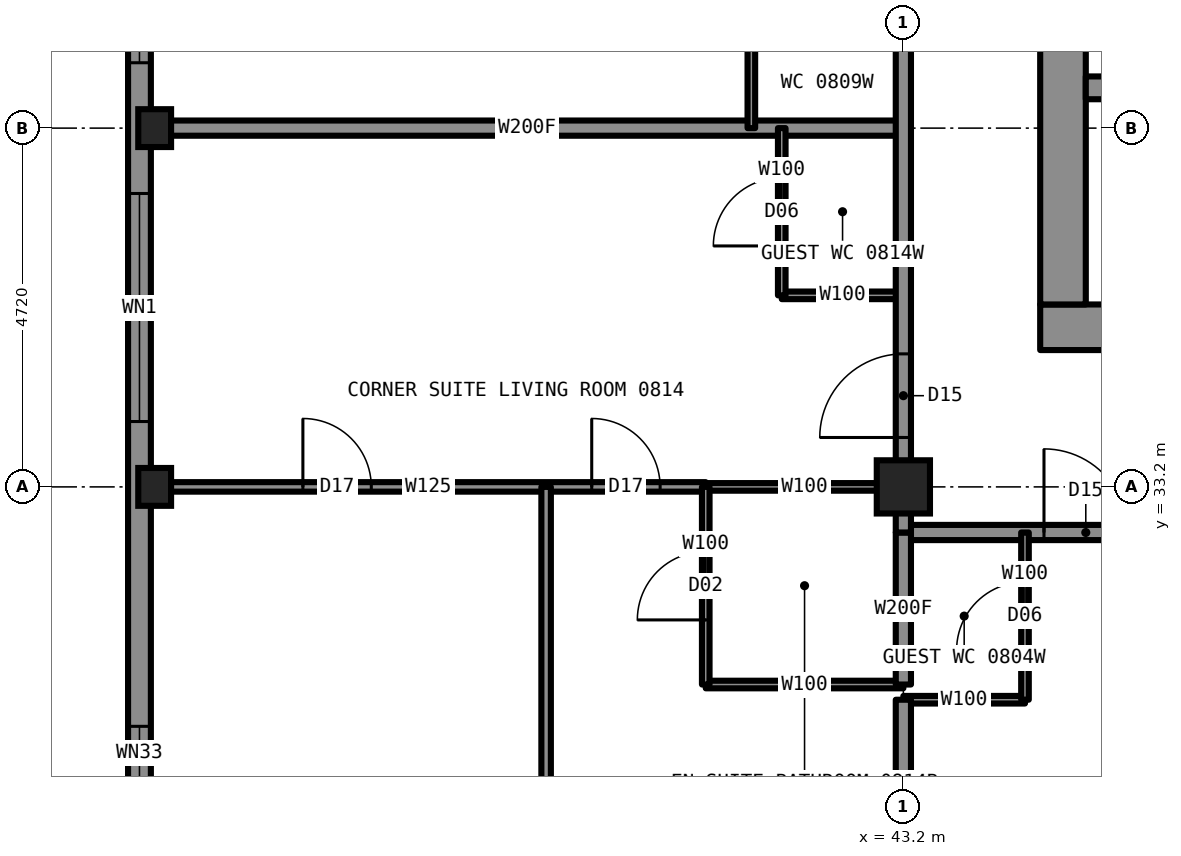
"""IFC4 building model, lengths in metres.
Left out: names, types, materials, properties, quantities, classifications, styles, units other than length and angle.
Written with IfcOpenShell. Run it as: python <this file> out.ifc"""

import sys

from ifc_helpers import new_model, si_unit, direction, frame, frame_2d, origin, origin_2d, place, context, subcontext, project, spatial, rectangle, hollow_rectangle, i_section, extrude, element, fill, save


model = new_model("IFC4")
c1 = context("Model", 3, precision=1e-05, world=origin(), true_north=direction((0.0, 1.0)))
c2 = subcontext(c1, "Body", "Model", "MODEL_VIEW")
j1 = project(units=[si_unit("LENGTHUNIT", "METRE"), si_unit("PLANEANGLEUNIT", "RADIAN")], contexts=[c1])
p1 = place(None, origin())
s1 = spatial("IfcSite", under=j1, at=p1, CompositionType="ELEMENT")
p2 = place(p1, origin())
s2 = spatial("IfcBuilding", under=s1, at=p2, CompositionType="ELEMENT")
p3 = place(p2, frame((0.0, 0.0, 28.5)))
s3 = spatial("IfcBuildingStorey", under=s2, at=p3, CompositionType="ELEMENT", Elevation=28.5)
for number, where, z_axis, x_axis in (
    (1, (33.35, 33.2, 0.0), (0.0, 0.0, 1.0), (1.0, 0.0, 0.0)),
    (2, (33.35, 37.92, 0.0), (0.0, 0.0, 1.0), (1.0, 0.0, 0.0)),
):
    element("IfcColumn", number, at=place(p3, frame(where, z_axis=z_axis, x_axis=x_axis)), inside=s3, PredefinedType="COLUMN", context=c2, shape_type="SweptSolid", body=[
        extrude(i_section(OverallWidth=0.432, OverallDepth=0.498, WebThickness=0.056, FlangeThickness=0.089, at=origin_2d()), origin(), (0.0, 0.0, 1.0), 3.5),
    ])
p4 = place(p3, frame((43.2, 33.2, 0.0), z_axis=(0.0, 0.0, 1.0), x_axis=(1.0, 0.0, 0.0)))
e3 = element("IfcColumn", 3, at=p4, inside=s3, PredefinedType="COLUMN", context=c2, shape_type="SweptSolid", body=[
    extrude(hollow_rectangle(XDim=0.7, YDim=0.7, WallThickness=0.06, at=origin_2d()), origin(), (0.0, 0.0, 1.0), 3.5),
])
p5 = place(p3, frame((45.0, 35.3, 0.0), z_axis=(0.0, 0.0, 1.0), x_axis=(1.0, 0.0, 0.0)))
e4 = element("IfcWall", 4, at=p5, inside=s3, PredefinedType="SHEAR", context=c2, shape_type="SweptSolid", body=[
    extrude(rectangle(XDim=20.0, YDim=0.6, at=frame_2d((10.0, 0.0))), origin(), (0.0, 0.0, 1.0), 3.5),
])
p6 = place(p3, frame((45.3, 35.6, 0.0), z_axis=(0.0, 0.0, 1.0), x_axis=(0.0, 1.0, 0.0)))
e5 = element("IfcWall", 5, at=p6, inside=s3, PredefinedType="SHEAR", context=c2, shape_type="SweptSolid", body=[
    extrude(rectangle(XDim=18.8, YDim=0.6, at=frame_2d((9.4, 0.0))), origin(), (0.0, 0.0, 1.0), 3.5),
])
p7 = place(p6, frame((13.4, 0.0, 0.0)))
e6 = element("IfcOpeningElement", 6, at=p7, cuts=e5, PredefinedType="OPENING", context=c2, shape_type="SweptSolid", body=[
    extrude(rectangle(XDim=1.8, YDim=2.2, at=frame_2d((0.9, 1.1))), frame((0.0, 0.31, 0.0), z_axis=(0.0, -1.0, 0.0), x_axis=(1.0, 0.0, 0.0)), (0.0, 0.0, 1.0), 0.62),
])
p8 = place(p6, frame((3.6, 0.0, 0.0)))
e7 = element("IfcOpeningElement", 7, at=p8, cuts=e5, PredefinedType="OPENING", context=c2, shape_type="SweptSolid", body=[
    extrude(rectangle(XDim=1.8, YDim=2.2, at=frame_2d((0.9, 1.1))), frame((0.0, 0.31, 0.0), z_axis=(0.0, -1.0, 0.0), x_axis=(1.0, 0.0, 0.0)), (0.0, 0.0, 1.0), 0.62),
])
p9 = place(p6, frame((6.4, 0.0, 0.0)))
e8 = element("IfcOpeningElement", 8, at=p9, cuts=e5, PredefinedType="OPENING", context=c2, shape_type="SweptSolid", body=[
    extrude(rectangle(XDim=1.2, YDim=2.2, at=frame_2d((0.6, 1.1))), frame((0.0, 0.31, 0.0), z_axis=(0.0, -1.0, 0.0), x_axis=(1.0, 0.0, 0.0)), (0.0, 0.0, 1.0), 0.62),
])
p10 = place(p3, frame((45.6, 38.45, 0.0), z_axis=(0.0, 0.0, 1.0), x_axis=(1.0, 0.0, 0.0)))
e9 = element("IfcWall", 9, at=p10, inside=s3, PredefinedType="SHEAR", context=c2, shape_type="SweptSolid", body=[
    extrude(rectangle(XDim=18.8, YDim=0.3, at=frame_2d((9.4, 0.0))), origin(), (0.0, 0.0, 1.0), 3.5),
])
p11 = place(p3, frame((40.6, 33.2, 0.0), z_axis=(0.0, 0.0, 1.0), x_axis=(1.0, 0.0, 0.0)))
e10 = element("IfcWall", 10, at=p11, inside=s3, PredefinedType="PARTITIONING", context=c2, shape_type="SweptSolid", body=[
    extrude(rectangle(XDim=2.6, YDim=0.1, at=frame_2d((1.3, 0.0))), origin(), (0.0, 0.0, 1.0), 2.573),
])
p12 = place(p3, frame((33.3, 33.2, 0.0), z_axis=(0.0, 0.0, 1.0), x_axis=(1.0, 0.0, 0.0)))
e11 = element("IfcWall", 11, at=p12, inside=s3, PredefinedType="PARTITIONING", context=c2, shape_type="SweptSolid", body=[
    extrude(rectangle(XDim=7.3, YDim=0.125, at=frame_2d((3.65, 0.0))), origin(), (0.0, 0.0, 1.0), 2.573),
])
p13 = place(p12, frame((5.8, 0.0, 0.0)))
e12 = element("IfcOpeningElement", 12, at=p13, cuts=e11, PredefinedType="OPENING", context=c2, shape_type="SweptSolid", body=[
    extrude(rectangle(XDim=0.9, YDim=2.2, at=frame_2d((0.45, 1.1))), frame((0.0, 0.073, 0.0), z_axis=(0.0, -1.0, 0.0), x_axis=(1.0, 0.0, 0.0)), (0.0, 0.0, 1.0), 0.145),
])
p14 = place(p12, frame((2.0, 0.0, 0.0)))
e13 = element("IfcOpeningElement", 13, at=p14, cuts=e11, PredefinedType="OPENING", context=c2, shape_type="SweptSolid", body=[
    extrude(rectangle(XDim=0.9, YDim=2.2, at=frame_2d((0.45, 1.1))), frame((0.0, 0.073, 0.0), z_axis=(0.0, -1.0, 0.0), x_axis=(1.0, 0.0, 0.0)), (0.0, 0.0, 1.0), 0.145),
])
p15 = place(p3, frame((43.2, 32.6, 0.0), z_axis=(0.0, 0.0, 1.0), x_axis=(1.0, 0.0, 0.0)))
e14 = element("IfcWall", 14, at=p15, inside=s3, PredefinedType="PARTITIONING", context=c2, shape_type="SweptSolid", body=[
    extrude(rectangle(XDim=23.6, YDim=0.2, at=frame_2d((11.8, 0.0))), origin(), (0.0, 0.0, 1.0), 3.33),
])
p16 = place(p15, frame((1.85, 0.0, 0.0)))
e15 = element("IfcOpeningElement", 15, at=p16, cuts=e14, PredefinedType="OPENING", context=c2, shape_type="SweptSolid", body=[
    extrude(rectangle(XDim=1.1, YDim=2.2, at=frame_2d((0.55, 1.1))), frame((0.0, 0.11, 0.0), z_axis=(0.0, -1.0, 0.0), x_axis=(1.0, 0.0, 0.0)), (0.0, 0.0, 1.0), 0.22),
])
p17 = place(p15, frame((14.56, 0.0, 0.0)))
e16 = element("IfcOpeningElement", 16, at=p17, cuts=e14, PredefinedType="OPENING", context=c2, shape_type="SweptSolid", body=[
    extrude(rectangle(XDim=1.0, YDim=2.2, at=frame_2d((0.5, 1.1))), frame((0.0, 0.11, 0.0), z_axis=(0.0, -1.0, 0.0), x_axis=(1.0, 0.0, 0.0)), (0.0, 0.0, 1.0), 0.22),
])
p18 = place(p15, frame((19.28, 0.0, 0.0)))
e17 = element("IfcOpeningElement", 17, at=p18, cuts=e14, PredefinedType="OPENING", context=c2, shape_type="SweptSolid", body=[
    extrude(rectangle(XDim=1.0, YDim=2.2, at=frame_2d((0.5, 1.1))), frame((0.0, 0.11, 0.0), z_axis=(0.0, -1.0, 0.0), x_axis=(1.0, 0.0, 0.0)), (0.0, 0.0, 1.0), 0.22),
])
p19 = place(p3, frame((40.6, 30.6, 0.0), z_axis=(0.0, 0.0, 1.0), x_axis=(1.0, 0.0, 0.0)))
e18 = element("IfcWall", 18, at=p19, inside=s3, PredefinedType="PARTITIONING", context=c2, shape_type="SweptSolid", body=[
    extrude(rectangle(XDim=2.6, YDim=0.1, at=frame_2d((1.3, 0.0))), origin(), (0.0, 0.0, 1.0), 3.33),
])
p20 = place(p3, frame((43.2, 30.4, 0.0), z_axis=(0.0, 0.0, 1.0), x_axis=(1.0, 0.0, 0.0)))
e19 = element("IfcWall", 19, at=p20, inside=s3, PredefinedType="PARTITIONING", context=c2, shape_type="SweptSolid", body=[
    extrude(rectangle(XDim=1.6, YDim=0.1, at=frame_2d((0.8, 0.0))), origin(), (0.0, 0.0, 1.0), 3.33),
])
p21 = place(p3, frame((33.3, 37.92, 0.0), z_axis=(0.0, 0.0, 1.0), x_axis=(1.0, 0.0, 0.0)))
e20 = element("IfcWall", 20, at=p21, inside=s3, PredefinedType="PARTITIONING", context=c2, shape_type="SweptSolid", body=[
    extrude(rectangle(XDim=9.9, YDim=0.2, at=frame_2d((4.95, 0.0))), origin(), (0.0, 0.0, 1.0), 2.573),
])
p22 = place(p3, frame((41.6, 35.72, 0.0), z_axis=(0.0, 0.0, 1.0), x_axis=(1.0, 0.0, 0.0)))
e21 = element("IfcWall", 21, at=p22, inside=s3, PredefinedType="PARTITIONING", context=c2, shape_type="SweptSolid", body=[
    extrude(rectangle(XDim=1.6, YDim=0.1, at=frame_2d((0.8, 0.0))), origin(), (0.0, 0.0, 1.0), 2.723),
])
p23 = place(p3, frame((44.8, 30.4, 0.0), z_axis=(0.0, 0.0, 1.0), x_axis=(0.0, 1.0, 0.0)))
e22 = element("IfcWall", 22, at=p23, inside=s3, PredefinedType="PARTITIONING", context=c2, shape_type="SweptSolid", body=[
    extrude(rectangle(XDim=2.2, YDim=0.1, at=frame_2d((1.1, 0.0))), origin(), (0.0, 0.0, 1.0), 3.33),
])
p24 = place(p23, frame((0.65, 0.0, 0.0)))
e23 = element("IfcOpeningElement", 23, at=p24, cuts=e22, PredefinedType="OPENING", context=c2, shape_type="SweptSolid", body=[
    extrude(rectangle(XDim=0.9, YDim=2.1, at=frame_2d((0.45, 1.05))), frame((0.0, 0.06, 0.0), z_axis=(0.0, -1.0, 0.0), x_axis=(1.0, 0.0, 0.0)), (0.0, 0.0, 1.0), 0.12),
])
p25 = place(p3, frame((43.2, 33.22, 0.0), z_axis=(0.0, 0.0, 1.0), x_axis=(0.0, 1.0, 0.0)))
e24 = element("IfcWall", 24, at=p25, inside=s3, PredefinedType="PARTITIONING", context=c2, shape_type="SweptSolid", body=[
    extrude(rectangle(XDim=23.56, YDim=0.2, at=frame_2d((11.78, 0.0))), origin(), (0.0, 0.0, 1.0), 3.33),
])
p26 = place(p25, frame((6.16, 0.0, 0.0)))
e25 = element("IfcOpeningElement", 25, at=p26, cuts=e24, PredefinedType="OPENING", context=c2, shape_type="SweptSolid", body=[
    extrude(rectangle(XDim=1.0, YDim=2.2, at=frame_2d((0.5, 1.1))), frame((0.0, 0.11, 0.0), z_axis=(0.0, -1.0, 0.0), x_axis=(1.0, 0.0, 0.0)), (0.0, 0.0, 1.0), 0.22),
])
p27 = place(p25, frame((11.68, 0.0, 0.0)))
e26 = element("IfcOpeningElement", 26, at=p27, cuts=e24, PredefinedType="OPENING", context=c2, shape_type="SweptSolid", body=[
    extrude(rectangle(XDim=1.0, YDim=2.2, at=frame_2d((0.5, 1.1))), frame((0.0, 0.11, 0.0), z_axis=(0.0, -1.0, 0.0), x_axis=(1.0, 0.0, 0.0)), (0.0, 0.0, 1.0), 0.22),
])
p28 = place(p25, frame((14.54, 0.0, 0.0)))
e27 = element("IfcOpeningElement", 27, at=p28, cuts=e24, PredefinedType="OPENING", context=c2, shape_type="SweptSolid", body=[
    extrude(rectangle(XDim=1.0, YDim=2.2, at=frame_2d((0.5, 1.1))), frame((0.0, 0.11, 0.0), z_axis=(0.0, -1.0, 0.0), x_axis=(1.0, 0.0, 0.0)), (0.0, 0.0, 1.0), 0.22),
])
p29 = place(p25, frame((21.83, 0.0, 0.0)))
e28 = element("IfcOpeningElement", 28, at=p29, cuts=e24, PredefinedType="OPENING", context=c2, shape_type="SweptSolid", body=[
    extrude(rectangle(XDim=1.1, YDim=2.2, at=frame_2d((0.55, 1.1))), frame((0.0, 0.11, 0.0), z_axis=(0.0, -1.0, 0.0), x_axis=(1.0, 0.0, 0.0)), (0.0, 0.0, 1.0), 0.22),
])
p30 = place(p25, frame((0.63, 0.0, 0.0)))
e29 = element("IfcOpeningElement", 29, at=p30, cuts=e24, PredefinedType="OPENING", context=c2, shape_type="SweptSolid", body=[
    extrude(rectangle(XDim=1.1, YDim=2.2, at=frame_2d((0.55, 1.1))), frame((0.0, 0.11, 0.0), z_axis=(0.0, -1.0, 0.0), x_axis=(1.0, 0.0, 0.0)), (0.0, 0.0, 1.0), 0.22),
])
p31 = place(p3, frame((43.2, 23.3, 0.0), z_axis=(0.0, 0.0, 1.0), x_axis=(0.0, 1.0, 0.0)))
e30 = element("IfcWall", 30, at=p31, inside=s3, PredefinedType="PARTITIONING", context=c2, shape_type="SweptSolid", body=[
    extrude(rectangle(XDim=7.1, YDim=0.2, at=frame_2d((3.55, 0.0))), origin(), (0.0, 0.0, 1.0), 2.573),
])
p32 = place(p3, frame((43.2, 30.6, 0.0), z_axis=(0.0, 0.0, 1.0), x_axis=(0.0, 1.0, 0.0)))
e31 = element("IfcWall", 31, at=p32, inside=s3, PredefinedType="PARTITIONING", context=c2, shape_type="SweptSolid", body=[
    extrude(rectangle(XDim=2.0, YDim=0.2, at=frame_2d((1.0, 0.0))), origin(), (0.0, 0.0, 1.0), 2.573),
])
p33 = place(p3, frame((41.6, 35.72, 0.0), z_axis=(0.0, 0.0, 1.0), x_axis=(0.0, 1.0, 0.0)))
e32 = element("IfcWall", 32, at=p33, inside=s3, PredefinedType="PARTITIONING", context=c2, shape_type="SweptSolid", body=[
    extrude(rectangle(XDim=2.2, YDim=0.1, at=frame_2d((1.1, 0.0))), origin(), (0.0, 0.0, 1.0), 3.33),
])
p34 = place(p33, frame((0.65, 0.0, 0.0)))
e33 = element("IfcOpeningElement", 33, at=p34, cuts=e32, PredefinedType="OPENING", context=c2, shape_type="SweptSolid", body=[
    extrude(rectangle(XDim=0.9, YDim=2.1, at=frame_2d((0.45, 1.05))), frame((0.0, 0.06, 0.0), z_axis=(0.0, -1.0, 0.0), x_axis=(1.0, 0.0, 0.0)), (0.0, 0.0, 1.0), 0.12),
])
p35 = place(p3, frame((41.2, 37.92, 0.0), z_axis=(0.0, 0.0, 1.0), x_axis=(0.0, 1.0, 0.0)))
e34 = element("IfcWall", 34, at=p35, inside=s3, PredefinedType="PARTITIONING", context=c2, shape_type="SweptSolid", body=[
    extrude(rectangle(XDim=1.2, YDim=0.1, at=frame_2d((0.6, 0.0))), origin(), (0.0, 0.0, 1.0), 3.33),
])
p36 = place(p3, frame((40.6, 30.6, 0.0), z_axis=(0.0, 0.0, 1.0), x_axis=(0.0, 1.0, 0.0)))
e35 = element("IfcWall", 35, at=p36, inside=s3, PredefinedType="PARTITIONING", context=c2, shape_type="SweptSolid", body=[
    extrude(rectangle(XDim=2.6, YDim=0.1, at=frame_2d((1.3, 0.0))), origin(), (0.0, 0.0, 1.0), 3.33),
])
p37 = place(p36, frame((0.85, 0.0, 0.0)))
e36 = element("IfcOpeningElement", 36, at=p37, cuts=e35, PredefinedType="OPENING", context=c2, shape_type="SweptSolid", body=[
    extrude(rectangle(XDim=0.9, YDim=2.1, at=frame_2d((0.45, 1.05))), frame((0.0, 0.06, 0.0), z_axis=(0.0, -1.0, 0.0), x_axis=(1.0, 0.0, 0.0)), (0.0, 0.0, 1.0), 0.12),
])
p38 = place(p3, frame((38.5, 23.306, 0.0), z_axis=(0.0, 0.0, 1.0), x_axis=(0.0, 1.0, 0.0)))
e37 = element("IfcWall", 37, at=p38, inside=s3, PredefinedType="PARTITIONING", context=c2, shape_type="SweptSolid", body=[
    extrude(rectangle(XDim=9.894, YDim=0.125, at=frame_2d((4.947, 0.0))), origin(), (0.0, 0.0, 1.0), 3.33),
])
p39 = place(p3, frame((33.15, 61.5, 0.0), z_axis=(0.0, 0.0, 1.0), x_axis=(0.0, -1.0, 0.0)))
e38 = element("IfcWall", 38, at=p39, inside=s3, PredefinedType="SOLIDWALL", context=c2, shape_type="SweptSolid", body=[
    extrude(rectangle(XDim=33.0, YDim=0.3, at=frame_2d((16.5, 0.0))), origin(), (0.0, 0.0, 1.0), 2.83),
])
p40 = place(p39, frame((0.85, 0.0, 0.5)))
e39 = element("IfcOpeningElement", 39, at=p40, cuts=e38, PredefinedType="OPENING", context=c2, shape_type="SweptSolid", body=[
    extrude(rectangle(XDim=3.0, YDim=2.0, at=frame_2d((1.5, 1.0))), frame((0.0, 0.16, 0.0), z_axis=(0.0, -1.0, 0.0), x_axis=(1.0, 0.0, 0.0)), (0.0, 0.0, 1.0), 0.32),
])
p41 = place(p39, frame((5.56, 0.0, 0.5)))
e40 = element("IfcOpeningElement", 40, at=p41, cuts=e38, PredefinedType="OPENING", context=c2, shape_type="SweptSolid", body=[
    extrude(rectangle(XDim=3.0, YDim=2.0, at=frame_2d((1.5, 1.0))), frame((0.0, 0.16, 0.0), z_axis=(0.0, -1.0, 0.0), x_axis=(1.0, 0.0, 0.0)), (0.0, 0.0, 1.0), 0.32),
])
p42 = place(p39, frame((10.28, 0.0, 0.5)))
e41 = element("IfcOpeningElement", 41, at=p42, cuts=e38, PredefinedType="OPENING", context=c2, shape_type="SweptSolid", body=[
    extrude(rectangle(XDim=3.0, YDim=2.0, at=frame_2d((1.5, 1.0))), frame((0.0, 0.16, 0.0), z_axis=(0.0, -1.0, 0.0), x_axis=(1.0, 0.0, 0.0)), (0.0, 0.0, 1.0), 0.32),
])
p43 = place(p39, frame((15.0, 0.0, 0.5)))
e42 = element("IfcOpeningElement", 42, at=p43, cuts=e38, PredefinedType="OPENING", context=c2, shape_type="SweptSolid", body=[
    extrude(rectangle(XDim=3.0, YDim=2.0, at=frame_2d((1.5, 1.0))), frame((0.0, 0.16, 0.0), z_axis=(0.0, -1.0, 0.0), x_axis=(1.0, 0.0, 0.0)), (0.0, 0.0, 1.0), 0.32),
])
p44 = place(p39, frame((19.72, 0.0, 0.5)))
e43 = element("IfcOpeningElement", 43, at=p44, cuts=e38, PredefinedType="OPENING", context=c2, shape_type="SweptSolid", body=[
    extrude(rectangle(XDim=3.0, YDim=2.0, at=frame_2d((1.5, 1.0))), frame((0.0, 0.16, 0.0), z_axis=(0.0, -1.0, 0.0), x_axis=(1.0, 0.0, 0.0)), (0.0, 0.0, 1.0), 0.32),
])
p45 = place(p39, frame((24.44, 0.0, 0.5)))
e44 = element("IfcOpeningElement", 44, at=p45, cuts=e38, PredefinedType="OPENING", context=c2, shape_type="SweptSolid", body=[
    extrude(rectangle(XDim=3.0, YDim=2.0, at=frame_2d((1.5, 1.0))), frame((0.0, 0.16, 0.0), z_axis=(0.0, -1.0, 0.0), x_axis=(1.0, 0.0, 0.0)), (0.0, 0.0, 1.0), 0.32),
])
p46 = place(p39, frame((29.15, 0.0, 0.5)))
e45 = element("IfcOpeningElement", 45, at=p46, cuts=e38, PredefinedType="OPENING", context=c2, shape_type="SweptSolid", body=[
    extrude(rectangle(XDim=3.0, YDim=2.0, at=frame_2d((1.5, 1.0))), frame((0.0, 0.16, 0.0), z_axis=(0.0, -1.0, 0.0), x_axis=(1.0, 0.0, 0.0)), (0.0, 0.0, 1.0), 0.32),
])
p47 = place(p3, frame((43.2, 32.6, 0.0), z_axis=(0.0, 0.0, 1.0), x_axis=(0.0, 1.0, 0.0)))
e46 = element("IfcWall", 46, at=p47, inside=s3, PredefinedType="PARTITIONING", context=c2, shape_type="SweptSolid", body=[
    extrude(rectangle(XDim=0.62, YDim=0.2, at=frame_2d((0.31, 0.0))), origin(), (0.0, 0.0, 1.0), 2.573),
])
p48 = place(p16, origin())
e47 = element("IfcDoor", 47, at=p48, inside=s3, OperationType="SINGLE_SWING_LEFT", PredefinedType="DOOR", context=c2, shape_type="SweptSolid", body=[
    extrude(rectangle(XDim=1.1, YDim=2.2, at=frame_2d((0.55, 1.1))), frame((0.0, 0.025, 0.0), z_axis=(0.0, -1.0, 0.0), x_axis=(1.0, 0.0, 0.0)), (0.0, 0.0, 1.0), 0.05),
])
fill(e15, e47)
p49 = place(p24, origin())
e48 = element("IfcDoor", 48, at=p49, inside=s3, OperationType="SINGLE_SWING_LEFT", PredefinedType="DOOR", context=c2, shape_type="SweptSolid", body=[
    extrude(rectangle(XDim=0.9, YDim=2.1, at=frame_2d((0.45, 1.05))), frame((0.0, 0.025, 0.0), z_axis=(0.0, -1.0, 0.0), x_axis=(1.0, 0.0, 0.0)), (0.0, 0.0, 1.0), 0.05),
])
fill(e23, e48)
p50 = place(p30, origin())
e49 = element("IfcDoor", 49, at=p50, inside=s3, OperationType="SINGLE_SWING_LEFT", PredefinedType="DOOR", context=c2, shape_type="SweptSolid", body=[
    extrude(rectangle(XDim=1.1, YDim=2.2, at=frame_2d((0.55, 1.1))), frame((0.0, 0.025, 0.0), z_axis=(0.0, -1.0, 0.0), x_axis=(1.0, 0.0, 0.0)), (0.0, 0.0, 1.0), 0.05),
])
fill(e29, e49)
p51 = place(p37, origin())
e50 = element("IfcDoor", 50, at=p51, inside=s3, OperationType="SINGLE_SWING_RIGHT", PredefinedType="DOOR", context=c2, shape_type="SweptSolid", body=[
    extrude(rectangle(XDim=0.9, YDim=2.1, at=frame_2d((0.45, 1.05))), frame((0.0, 0.025, 0.0), z_axis=(0.0, -1.0, 0.0), x_axis=(1.0, 0.0, 0.0)), (0.0, 0.0, 1.0), 0.05),
])
fill(e36, e50)
p52 = place(p13, origin())
e51 = element("IfcDoor", 51, at=p52, inside=s3, OperationType="SINGLE_SWING_LEFT", PredefinedType="DOOR", context=c2, shape_type="SweptSolid", body=[
    extrude(rectangle(XDim=0.9, YDim=2.2, at=frame_2d((0.45, 1.1))), frame((0.0, 0.025, 0.0), z_axis=(0.0, -1.0, 0.0), x_axis=(1.0, 0.0, 0.0)), (0.0, 0.0, 1.0), 0.05),
])
fill(e12, e51)
p53 = place(p14, origin())
e52 = element("IfcDoor", 52, at=p53, inside=s3, OperationType="SINGLE_SWING_LEFT", PredefinedType="DOOR", context=c2, shape_type="SweptSolid", body=[
    extrude(rectangle(XDim=0.9, YDim=2.2, at=frame_2d((0.45, 1.1))), frame((0.0, 0.025, 0.0), z_axis=(0.0, -1.0, 0.0), x_axis=(1.0, 0.0, 0.0)), (0.0, 0.0, 1.0), 0.05),
])
fill(e13, e52)
p54 = place(p34, origin())
e53 = element("IfcDoor", 53, at=p54, inside=s3, OperationType="SINGLE_SWING_LEFT", PredefinedType="DOOR", context=c2, shape_type="SweptSolid", body=[
    extrude(rectangle(XDim=0.9, YDim=2.1, at=frame_2d((0.45, 1.05))), frame((0.0, 0.025, 0.0), z_axis=(0.0, -1.0, 0.0), x_axis=(1.0, 0.0, 0.0)), (0.0, 0.0, 1.0), 0.05),
])
fill(e33, e53)
p55 = place(p44, origin())
e54 = element("IfcWindow", 54, at=p55, inside=s3, PartitioningType="SINGLE_PANEL", PredefinedType="WINDOW", context=c2, shape_type="SweptSolid", body=[
    extrude(rectangle(XDim=3.0, YDim=2.0, at=frame_2d((1.5, 1.0))), frame((0.0, 0.03, 0.0), z_axis=(0.0, -1.0, 0.0), x_axis=(1.0, 0.0, 0.0)), (0.0, 0.0, 1.0), 0.06),
])
fill(e43, e54)
p56 = place(p45, origin())
e55 = element("IfcWindow", 55, at=p56, inside=s3, PartitioningType="SINGLE_PANEL", PredefinedType="WINDOW", context=c2, shape_type="SweptSolid", body=[
    extrude(rectangle(XDim=3.0, YDim=2.0, at=frame_2d((1.5, 1.0))), frame((0.0, 0.03, 0.0), z_axis=(0.0, -1.0, 0.0), x_axis=(1.0, 0.0, 0.0)), (0.0, 0.0, 1.0), 0.06),
])
fill(e44, e55)
p57 = place(p46, origin())
e56 = element("IfcWindow", 56, at=p57, inside=s3, PartitioningType="SINGLE_PANEL", PredefinedType="WINDOW", context=c2, shape_type="SweptSolid", body=[
    extrude(rectangle(XDim=3.0, YDim=2.0, at=frame_2d((1.5, 1.0))), frame((0.0, 0.03, 0.0), z_axis=(0.0, -1.0, 0.0), x_axis=(1.0, 0.0, 0.0)), (0.0, 0.0, 1.0), 0.06),
])
fill(e45, e56)
save(model, sys.argv[1])
